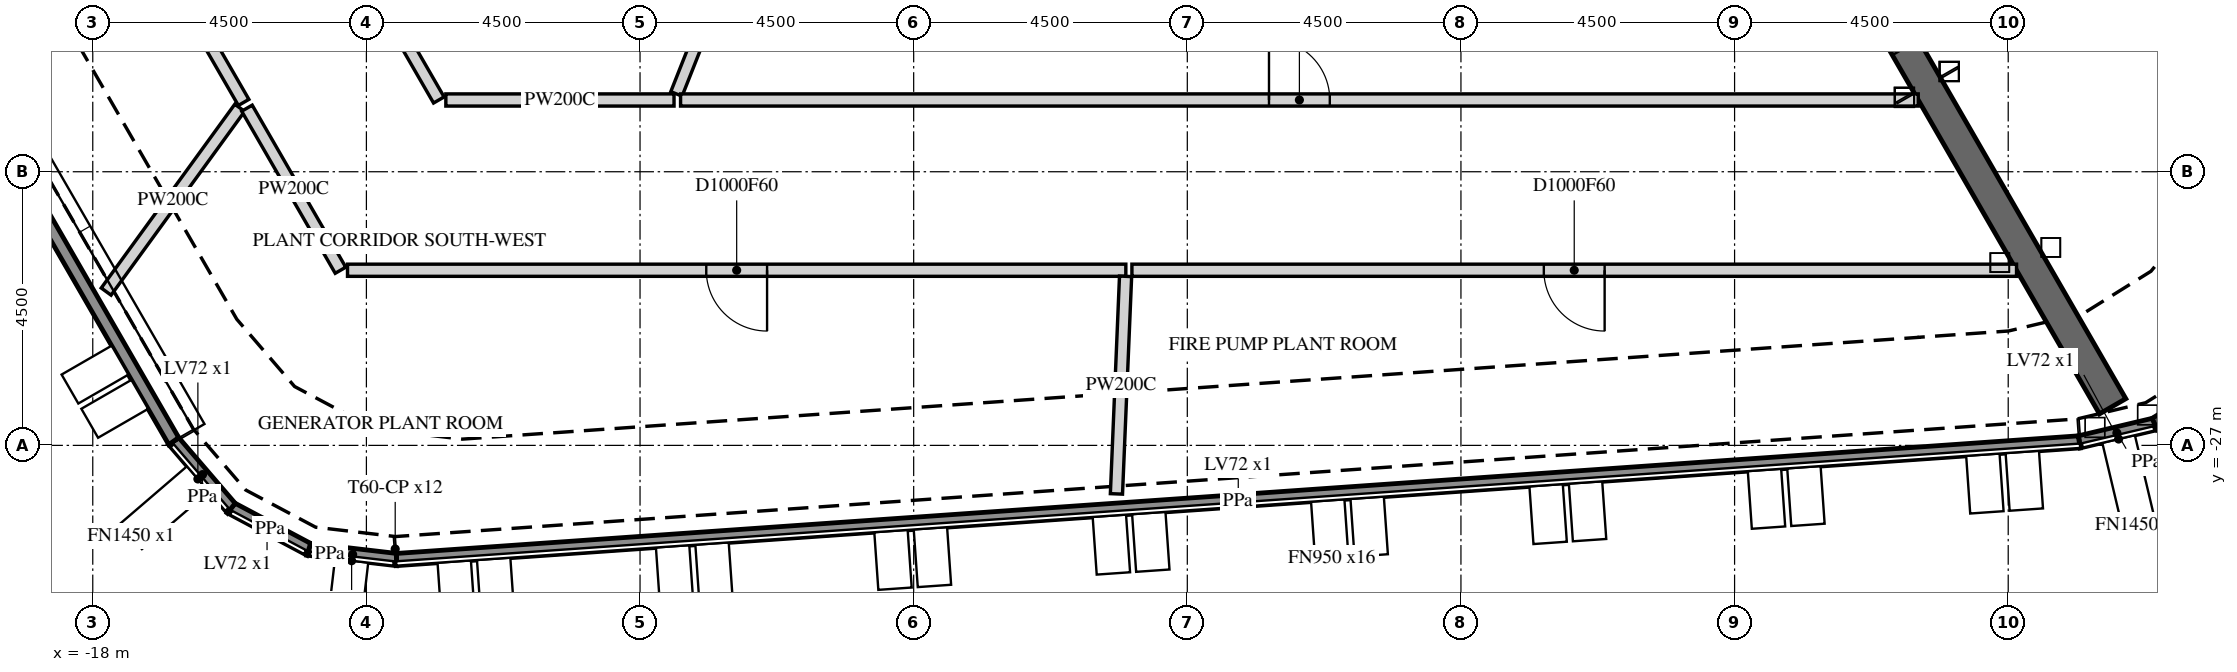
"""IFC4 building model, lengths in metres.
Left out: names, types, materials, properties, quantities, classifications, styles, units other than length and angle.
Written with IfcOpenShell. Run it as: python <this file> out.ifc"""

import sys

from ifc_helpers import new_model, si_unit, direction, frame, frame_2d, origin, place, context, subcontext, project, spatial, polyline, rectangle, outline, extrude, element, fill, save


model = new_model("IFC4")
c1 = context("Model", 3, precision=1e-05, world=origin(), true_north=direction((0.0, 1.0)))
c2 = subcontext(c1, "Body", "Model", "MODEL_VIEW")
j1 = project(units=[si_unit("LENGTHUNIT", "METRE"), si_unit("PLANEANGLEUNIT", "RADIAN")], contexts=[c1])
p1 = place(None, origin())
s1 = spatial("IfcSite", under=j1, at=p1, CompositionType="ELEMENT")
p2 = place(p1, origin())
s2 = spatial("IfcBuilding", under=s1, at=p2, CompositionType="ELEMENT")
p3 = place(p2, frame((0.0, 0.0, 250.2)))
s3 = spatial("IfcBuildingStorey", under=s2, at=p3, CompositionType="ELEMENT", Elevation=250.2)
p4 = place(p3, frame((16.979, -25.979, 5.7), z_axis=(0.0, 0.0, 1.0), x_axis=(-0.848052526064, -0.529912174834, 0.0)))
e1 = element("IfcWall", 1, at=p4, inside=s3, PredefinedType="PARAPET", context=c2, shape_type="SweptSolid", body=[
    extrude(outline(polyline([(0.016, -0.1), (1.248, -0.1), (1.281, 0.1), (-0.016, 0.1), (0.016, -0.1)])), origin(), (0.0, 0.0, 1.0), 1.1),
])
p5 = place(p3, frame((15.906, -26.649, 5.7), z_axis=(0.0, 0.0, 1.0), x_axis=(-0.97305877523, -0.230557194525, 0.0)))
e2 = element("IfcWall", 2, at=p5, inside=s3, PredefinedType="PARAPET", context=c2, shape_type="SweptSolid", body=[
    extrude(outline(polyline([(0.016, -0.1), (1.265, -0.1), (1.281, 0.1), (-0.016, 0.1), (0.016, -0.1)])), origin(), (0.0, 0.0, 1.0), 1.1),
])
p6 = place(p3, frame((14.668, -26.942, 5.7), z_axis=(0.0, 0.0, 1.0), x_axis=(-0.997564089626, -0.069755910774, 0.0)))
e3 = element("IfcWall", 3, at=p6, inside=s3, PredefinedType="PARAPET", context=c2, shape_type="SweptSolid", body=[
    extrude(outline(polyline([(0.008, -0.1), (27.731, -0.1), (27.75, 0.1), (-0.008, 0.1), (0.008, -0.1)])), origin(), (0.0, 0.0, 1.0), 1.1),
])
p7 = place(p3, frame((-13.005, -28.877, 5.7), z_axis=(0.0, 0.0, 1.0), x_axis=(-0.993251202983, 0.115982963286, 0.0)))
e4 = element("IfcWall", 4, at=p7, inside=s3, PredefinedType="PARAPET", context=c2, shape_type="SweptSolid", body=[
    extrude(outline(polyline([(0.009, -0.1), (1.434, -0.1), (1.471, 0.1), (-0.009, 0.1), (0.009, -0.1)])), origin(), (0.0, 0.0, 1.0), 1.1),
])
p8 = place(p3, frame((-14.448, -28.709, 5.7), z_axis=(0.0, 0.0, 1.0), x_axis=(-0.882946998442, 0.46947268072, 0.0)))
e5 = element("IfcWall", 5, at=p8, inside=s3, PredefinedType="PARAPET", context=c2, shape_type="SweptSolid", body=[
    extrude(outline(polyline([(0.019, -0.1), (1.424, -0.1), (1.462, 0.1), (-0.019, 0.1), (0.019, -0.1)])), origin(), (0.0, 0.0, 1.0), 1.1),
])
p9 = place(p3, frame((-15.722, -28.031, 5.7), z_axis=(0.0, 0.0, 1.0), x_axis=(-0.651732002744, 0.75844933687, 0.0)))
e6 = element("IfcWall", 6, at=p9, inside=s3, PredefinedType="PARAPET", context=c2, shape_type="SweptSolid", body=[
    extrude(outline(polyline([(0.019, -0.1), (1.443, -0.1), (1.462, 0.1), (-0.019, 0.1), (0.019, -0.1)])), origin(), (0.0, 0.0, 1.0), 1.1),
])
p10 = place(p3, frame((-16.668, -26.93, 5.7), z_axis=(0.0, 0.0, 1.0), x_axis=(-0.499997219864, 0.866027008891, 0.0)))
e7 = element("IfcWall", 7, at=p10, inside=s3, PredefinedType="PARAPET", context=c2, shape_type="SweptSolid", body=[
    extrude(outline(polyline([(0.009, -0.1), (27.732, -0.1), (27.749, 0.1), (-0.009, 0.1), (0.009, -0.1)])), origin(), (0.0, 0.0, 1.0), 1.1),
])
p11 = place(p3, frame((7.506, -13.0, -0.3), z_axis=(0.0, 0.0, 1.0), x_axis=(0.499988271576, -0.866032175087, 0.0)))
e8 = element("IfcWall", 8, at=p11, inside=s3, PredefinedType="SHEAR", context=c2, shape_type="SweptSolid", body=[
    extrude(rectangle(XDim=15.424, YDim=0.5, at=frame_2d((7.712, 0.0))), origin(), (0.0, 0.0, 1.0), 5.8),
])
p12 = place(p11, frame((6.812, 0.0, 0.3)))
e9 = element("IfcOpeningElement", 9, at=p12, cuts=e8, PredefinedType="OPENING", context=c2, shape_type="SweptSolid", body=[
    extrude(rectangle(XDim=1.8, YDim=2.4, at=frame_2d((0.9, 1.2))), frame((0.0, 0.26, 0.0), z_axis=(0.0, -1.0, 0.0), x_axis=(1.0, 0.0, 0.0)), (0.0, 0.0, 1.0), 0.52),
])
p13 = place(p3, frame((-15.519, -21.36, 0.0), z_axis=(0.0, 0.0, 1.0), x_axis=(-0.500040928938, 0.866001772162, 0.0)))
e10 = element("IfcWall", 10, at=p13, inside=s3, PredefinedType="PARTITIONING", context=c2, shape_type="SweptSolid", body=[
    extrude(rectangle(XDim=10.639, YDim=0.2, at=frame_2d((5.32, 0.0))), origin(), (0.0, 0.0, 1.0), 5.5),
])
p14 = place(p13, frame((4.82, 0.0, 0.0)))
e11 = element("IfcOpeningElement", 11, at=p14, cuts=e10, PredefinedType="OPENING", context=c2, shape_type="SweptSolid", body=[
    extrude(rectangle(XDim=1.0, YDim=2.1, at=frame_2d((0.5, 1.05))), frame((0.0, 0.11, 0.0), z_axis=(0.0, -1.0, 0.0), x_axis=(1.0, 0.0, 0.0)), (0.0, 0.0, 1.0), 0.22),
])
p15 = place(p3, frame((-17.78, -24.471, 0.0), z_axis=(0.0, 0.0, 1.0), x_axis=(0.587876353265, 0.808950797807, 0.0)))
e12 = element("IfcWall", 12, at=p15, inside=s3, PredefinedType="PARTITIONING", context=c2, shape_type="SweptSolid", body=[
    extrude(rectangle(XDim=3.736, YDim=0.2, at=frame_2d((1.868, 0.0))), origin(), (0.0, 0.0, 1.0), 5.5),
])
p16 = place(p3, frame((-15.464, -21.455, 0.0), z_axis=(0.0, 0.0, 1.0), x_axis=(0.49988498741, -0.866091796152, 0.0)))
e13 = element("IfcWall", 13, at=p16, inside=s3, PredefinedType="PARTITIONING", context=c2, shape_type="SweptSolid", body=[
    extrude(rectangle(XDim=3.077, YDim=0.2, at=frame_2d((1.539, 0.0))), origin(), (0.0, 0.0, 1.0), 5.5),
])
p17 = place(p3, frame((-1.011, -24.12, 0.0), z_axis=(0.0, 0.0, 1.0), x_axis=(-1.0, 0.0, 0.0)))
e14 = element("IfcWall", 14, at=p17, inside=s3, PredefinedType="PARTITIONING", context=c2, shape_type="SweptSolid", body=[
    extrude(rectangle(XDim=12.8, YDim=0.2, at=frame_2d((6.4, 0.0))), origin(), (0.0, 0.0, 1.0), 5.5),
])
p18 = place(p17, frame((5.9, 0.0, 0.0)))
e15 = element("IfcOpeningElement", 15, at=p18, cuts=e14, PredefinedType="OPENING", context=c2, shape_type="SweptSolid", body=[
    extrude(rectangle(XDim=1.0, YDim=2.1, at=frame_2d((0.5, 1.05))), frame((0.0, 0.11, 0.0), z_axis=(0.0, -1.0, 0.0), x_axis=(1.0, 0.0, 0.0)), (0.0, 0.0, 1.0), 0.22),
])
p19 = place(p3, frame((-22.63, -3.443, 0.0), z_axis=(0.0, 0.0, 1.0), x_axis=(0.49999205116, -0.866029993001, 0.0)))
e16 = element("IfcWall", 16, at=p19, inside=s3, PredefinedType="PARTITIONING", context=c2, shape_type="SweptSolid", body=[
    extrude(rectangle(XDim=20.642, YDim=0.2, at=frame_2d((10.321, 0.0))), origin(), (0.0, 0.0, 1.0), 5.5),
])
p20 = place(p19, frame((9.821, 0.0, 0.0)))
e17 = element("IfcOpeningElement", 17, at=p20, cuts=e16, PredefinedType="OPENING", context=c2, shape_type="SweptSolid", body=[
    extrude(rectangle(XDim=1.0, YDim=2.1, at=frame_2d((0.5, 1.05))), frame((0.0, 0.11, 0.0), z_axis=(0.0, -1.0, 0.0), x_axis=(1.0, 0.0, 0.0)), (0.0, 0.0, 1.0), 0.22),
])
p21 = place(p3, frame((-8.441, -21.32, 0.0), z_axis=(0.0, 0.0, 1.0), x_axis=(-1.0, 0.0, 0.0)))
e18 = element("IfcWall", 18, at=p21, inside=s3, PredefinedType="PARTITIONING", context=c2, shape_type="SweptSolid", body=[
    extrude(rectangle(XDim=3.753, YDim=0.2, at=frame_2d((1.876, 0.0))), origin(), (0.0, 0.0, 1.0), 5.5),
])
p22 = place(p3, frame((-8.401, -21.22, 0.0), z_axis=(0.0, 0.0, 1.0), x_axis=(0.368104754475, 0.92978432431, 0.0)))
e19 = element("IfcWall", 19, at=p22, inside=s3, PredefinedType="PARTITIONING", context=c2, shape_type="SweptSolid", body=[
    extrude(rectangle(XDim=5.076, YDim=0.2, at=frame_2d((2.538, 0.0))), origin(), (0.0, 0.0, 1.0), 4.573),
])
p23 = place(p3, frame((-1.165, -27.798, 0.0), z_axis=(0.0, 0.0, 1.0), x_axis=(0.041928296331, 0.999120622331, 0.0)))
e20 = element("IfcWall", 20, at=p23, inside=s3, PredefinedType="PARTITIONING", context=c2, shape_type="SweptSolid", body=[
    extrude(rectangle(XDim=3.581, YDim=0.2, at=frame_2d((1.791, 0.0))), origin(), (0.0, 0.0, 1.0), 5.5),
])
p24 = place(p3, frame((13.637, -24.12, 0.0), z_axis=(0.0, 0.0, 1.0), x_axis=(-1.0, 0.0, 0.0)))
e21 = element("IfcWall", 21, at=p24, inside=s3, PredefinedType="PARTITIONING", context=c2, shape_type="SweptSolid", body=[
    extrude(rectangle(XDim=14.548, YDim=0.2, at=frame_2d((7.274, 0.0))), origin(), (0.0, 0.0, 1.0), 5.5),
])
p25 = place(p24, frame((6.774, 0.0, 0.0)))
e22 = element("IfcOpeningElement", 22, at=p25, cuts=e21, PredefinedType="OPENING", context=c2, shape_type="SweptSolid", body=[
    extrude(rectangle(XDim=1.0, YDim=2.1, at=frame_2d((0.5, 1.05))), frame((0.0, 0.11, 0.0), z_axis=(0.0, -1.0, 0.0), x_axis=(1.0, 0.0, 0.0)), (0.0, 0.0, 1.0), 0.22),
])
p26 = place(p3, frame((-8.333, -21.32, 0.0), z_axis=(0.0, 0.0, 1.0), x_axis=(1.0, 0.0, 0.0)))
e23 = element("IfcWall", 23, at=p26, inside=s3, PredefinedType="PARTITIONING", context=c2, shape_type="SweptSolid", body=[
    extrude(rectangle(XDim=20.354, YDim=0.2, at=frame_2d((10.177, 0.0))), origin(), (0.0, 0.0, 1.0), 5.5),
])
p27 = place(p26, frame((9.677, 0.0, 0.0)))
e24 = element("IfcOpeningElement", 24, at=p27, cuts=e23, PredefinedType="OPENING", context=c2, shape_type="SweptSolid", body=[
    extrude(rectangle(XDim=1.0, YDim=2.1, at=frame_2d((0.5, 1.05))), frame((0.0, 0.11, 0.0), z_axis=(0.0, -1.0, 0.0), x_axis=(1.0, 0.0, 0.0)), (0.0, 0.0, 1.0), 0.22),
])
p28 = place(p18, origin())
e25 = element("IfcDoor", 25, at=p28, inside=s3, OperationType="SINGLE_SWING_LEFT", PredefinedType="DOOR", context=c2, shape_type="SweptSolid", body=[
    extrude(rectangle(XDim=1.0, YDim=2.1, at=frame_2d((0.5, 1.05))), frame((0.0, 0.025, 0.0), z_axis=(0.0, -1.0, 0.0), x_axis=(1.0, 0.0, 0.0)), (0.0, 0.0, 1.0), 0.05),
])
fill(e15, e25)
p29 = place(p25, origin())
e26 = element("IfcDoor", 26, at=p29, inside=s3, OperationType="SINGLE_SWING_LEFT", PredefinedType="DOOR", context=c2, shape_type="SweptSolid", body=[
    extrude(rectangle(XDim=1.0, YDim=2.1, at=frame_2d((0.5, 1.05))), frame((0.0, 0.025, 0.0), z_axis=(0.0, -1.0, 0.0), x_axis=(1.0, 0.0, 0.0)), (0.0, 0.0, 1.0), 0.05),
])
fill(e22, e26)
p30 = place(p27, origin())
e27 = element("IfcDoor", 27, at=p30, inside=s3, OperationType="SINGLE_SWING_RIGHT", PredefinedType="DOOR", context=c2, shape_type="SweptSolid", body=[
    extrude(rectangle(XDim=1.0, YDim=2.1, at=frame_2d((0.5, 1.05))), frame((0.0, 0.025, 0.0), z_axis=(0.0, -1.0, 0.0), x_axis=(1.0, 0.0, 0.0)), (0.0, 0.0, 1.0), 0.05),
])
fill(e24, e27)
save(model, sys.argv[1])
